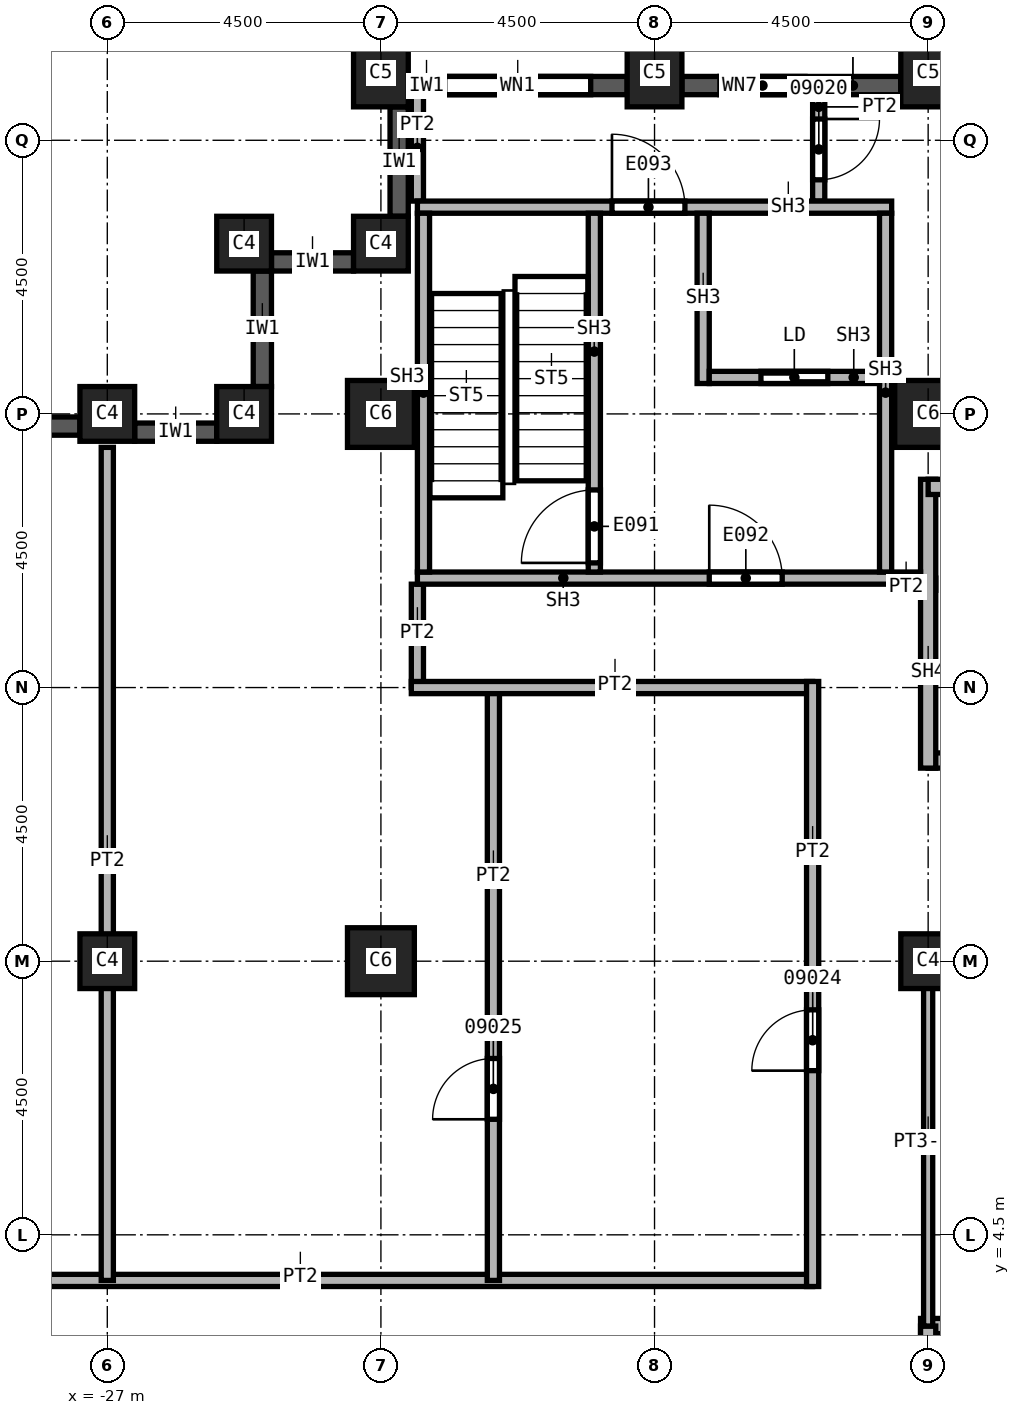
"""IFC4 building model, lengths in metres.
Left out: names, types, materials, properties, quantities, classifications, styles, units other than length and angle.
Written with IfcOpenShell. Run it as: python <this file> out.ifc"""

import sys

from ifc_helpers import new_model, si_unit, direction, frame, frame_2d, origin, origin_2d, place, context, subcontext, project, spatial, rectangle, extrude, element, fill, save


model = new_model("IFC4")
c1 = context("Model", 3, precision=1e-05, world=origin(), true_north=direction((0.0, 1.0)))
c2 = subcontext(c1, "Body", "Model", "MODEL_VIEW")
j1 = project(units=[si_unit("LENGTHUNIT", "METRE"), si_unit("PLANEANGLEUNIT", "RADIAN")], contexts=[c1])
p1 = place(None, origin())
s1 = spatial("IfcSite", under=j1, at=p1, CompositionType="ELEMENT")
p2 = place(p1, origin())
s2 = spatial("IfcBuilding", under=s1, at=p2, CompositionType="ELEMENT")
p3 = place(p2, frame((0.0, 0.0, 166.0)))
s3 = spatial("IfcBuildingStorey", under=s2, at=p3, CompositionType="ELEMENT", Elevation=166.0)
for number, where, z_axis, x_axis in (
    (1, (-13.5, 18.0, 0.0), (0.0, 0.0, 1.0), (1.0, 0.0, 0.0)),
    (2, (-22.5, 9.0, 0.0), (0.0, 0.0, 1.0), (1.0, 0.0, 0.0)),
    (3, (-22.5, 18.0, 0.0), (0.0, 0.0, 1.0), (1.0, 0.0, 0.0)),
):
    element("IfcColumn", number, at=place(p3, frame(where, z_axis=z_axis, x_axis=x_axis)), inside=s3, PredefinedType="COLUMN", context=c2, shape_type="SweptSolid", body=[
        extrude(rectangle(XDim=1.1, YDim=1.1, at=origin_2d()), origin(), (0.0, 0.0, 1.0), 3.7),
    ])
p4 = place(p3, frame((-13.5, 9.0, 0.0), z_axis=(0.0, 0.0, 1.0), x_axis=(1.0, 0.0, 0.0)))
e4 = element("IfcColumn", 4, at=p4, inside=s3, PredefinedType="COLUMN", context=c2, shape_type="SweptSolid", body=[
    extrude(rectangle(XDim=0.9, YDim=0.9, at=origin_2d()), origin(), (0.0, 0.0, 1.0), 3.7),
])
for number, where, z_axis, x_axis in (
    (5, (-13.5, 23.6, 0.0), (0.0, 0.0, 1.0), (1.0, 0.0, 0.0)),
    (6, (-18.0, 23.6, 0.0), (0.0, 0.0, 1.0), (1.0, 0.0, 0.0)),
    (7, (-22.5, 23.6, 0.0), (0.0, 0.0, 1.0), (1.0, 0.0, 0.0)),
):
    element("IfcColumn", number, at=place(p3, frame(where, z_axis=z_axis, x_axis=x_axis)), inside=s3, PredefinedType="COLUMN", context=c2, shape_type="SweptSolid", body=[
        extrude(rectangle(XDim=0.9, YDim=1.1, at=origin_2d()), origin(), (0.0, 0.0, 1.0), 3.7),
    ])
for number, where, z_axis, x_axis in (
    (8, (-27.0, 9.0, 0.0), (0.0, 0.0, 1.0), (1.0, 0.0, 0.0)),
    (9, (-27.0, 18.0, 0.0), (0.0, 0.0, 1.0), (1.0, 0.0, 0.0)),
    (10, (-22.5, 20.8, 0.0), (0.0, 0.0, 1.0), (1.0, 0.0, 0.0)),
    (11, (-24.75, 20.8, 0.0), (0.0, 0.0, 1.0), (1.0, 0.0, 0.0)),
    (12, (-24.75, 18.0, 0.0), (0.0, 0.0, 1.0), (1.0, 0.0, 0.0)),
):
    element("IfcColumn", number, at=place(p3, frame(where, z_axis=z_axis, x_axis=x_axis)), inside=s3, PredefinedType="COLUMN", context=c2, shape_type="SweptSolid", body=[
        extrude(rectangle(XDim=0.9, YDim=0.9, at=origin_2d()), origin(), (0.0, 0.0, 1.0), 3.7),
    ])
p5 = place(p3, frame((-22.2, 23.05, 0.0), z_axis=(0.0, 0.0, 1.0), x_axis=(0.0, -1.0, 0.0)))
e13 = element("IfcWall", 13, at=p5, inside=s3, PredefinedType="SOLIDWALL", context=c2, shape_type="SweptSolid", body=[
    extrude(rectangle(XDim=1.8, YDim=0.3, at=frame_2d((0.9, 0.0))), origin(), (0.0, 0.0, 1.0), 3.1),
])
p6 = place(p3, frame((-22.95, 20.5, 0.0), z_axis=(0.0, 0.0, 1.0), x_axis=(-1.0, 0.0, 0.0)))
e14 = element("IfcWall", 14, at=p6, inside=s3, PredefinedType="SOLIDWALL", context=c2, shape_type="SweptSolid", body=[
    extrude(rectangle(XDim=1.35, YDim=0.3, at=frame_2d((0.675, 0.0))), origin(), (0.0, 0.0, 1.0), 3.1),
])
p7 = place(p3, frame((-24.45, 20.35, 0.0), z_axis=(0.0, 0.0, 1.0), x_axis=(0.0, -1.0, 0.0)))
e15 = element("IfcWall", 15, at=p7, inside=s3, PredefinedType="SOLIDWALL", context=c2, shape_type="SweptSolid", body=[
    extrude(rectangle(XDim=1.9, YDim=0.3, at=frame_2d((0.95, 0.0))), origin(), (0.0, 0.0, 1.0), 3.1),
])
p8 = place(p3, frame((-25.2, 17.7, 0.0), z_axis=(0.0, 0.0, 1.0), x_axis=(-1.0, 0.0, 0.0)))
e16 = element("IfcWall", 16, at=p8, inside=s3, PredefinedType="SOLIDWALL", context=c2, shape_type="SweptSolid", body=[
    extrude(rectangle(XDim=1.35, YDim=0.3, at=frame_2d((0.675, 0.0))), origin(), (0.0, 0.0, 1.0), 3.1),
])
p9 = place(p3, frame((-27.45, 17.8, 0.0), z_axis=(0.0, 0.0, 1.0), x_axis=(-1.0, 0.0, 0.0)))
e17 = element("IfcWall", 17, at=p9, inside=s3, PredefinedType="SOLIDWALL", context=c2, shape_type="SweptSolid", body=[
    extrude(rectangle(XDim=3.6, YDim=0.3, at=frame_2d((1.8, 0.0))), origin(), (0.0, 0.0, 1.0), 3.1),
])
p10 = place(p9, frame((0.6, 0.0, 0.8)))
e18 = element("IfcOpeningElement", 18, at=p10, cuts=e17, PredefinedType="OPENING", context=c2, shape_type="SweptSolid", body=[
    extrude(rectangle(XDim=2.4, YDim=1.95, at=frame_2d((1.2, 0.975))), frame((0.0, 0.15, 0.0), z_axis=(0.0, -1.0, 0.0), x_axis=(1.0, 0.0, 0.0)), (0.0, 0.0, 1.0), 0.3),
])
p11 = place(p3, frame((-13.95, 23.4, 0.0), z_axis=(0.0, 0.0, 1.0), x_axis=(-1.0, 0.0, 0.0)))
e19 = element("IfcWall", 19, at=p11, inside=s3, PredefinedType="SOLIDWALL", context=c2, shape_type="SweptSolid", body=[
    extrude(rectangle(XDim=3.6, YDim=0.3, at=frame_2d((1.8, 0.0))), origin(), (0.0, 0.0, 1.0), 3.1),
])
p12 = place(p11, frame((1.575, 0.0, 0.8)))
e20 = element("IfcOpeningElement", 20, at=p12, cuts=e19, PredefinedType="OPENING", context=c2, shape_type="SweptSolid", body=[
    extrude(rectangle(XDim=1.4, YDim=1.95, at=frame_2d((0.7, 0.975))), frame((0.0, 0.15, 0.0), z_axis=(0.0, -1.0, 0.0), x_axis=(1.0, 0.0, 0.0)), (0.0, 0.0, 1.0), 0.3),
])
p13 = place(p3, frame((-18.45, 23.4, 0.0), z_axis=(0.0, 0.0, 1.0), x_axis=(-1.0, 0.0, 0.0)))
e21 = element("IfcWall", 21, at=p13, inside=s3, PredefinedType="SOLIDWALL", context=c2, shape_type="SweptSolid", body=[
    extrude(rectangle(XDim=3.6, YDim=0.3, at=frame_2d((1.8, 0.0))), origin(), (0.0, 0.0, 1.0), 3.1),
])
p14 = place(p13, frame((0.6, 0.0, 0.8)))
e22 = element("IfcOpeningElement", 22, at=p14, cuts=e21, PredefinedType="OPENING", context=c2, shape_type="SweptSolid", body=[
    extrude(rectangle(XDim=2.4, YDim=1.95, at=frame_2d((1.2, 0.975))), frame((0.0, 0.15, 0.0), z_axis=(0.0, -1.0, 0.0), x_axis=(1.0, 0.0, 0.0)), (0.0, 0.0, 1.0), 0.3),
])
p15 = place(p3, frame((-33.85, 3.75, 0.0), z_axis=(0.0, 0.0, 1.0), x_axis=(1.0, 0.0, 0.0)))
e23 = element("IfcWall", 23, at=p15, inside=s3, PredefinedType="PARTITIONING", context=c2, shape_type="SweptSolid", body=[
    extrude(rectangle(XDim=18.45, YDim=0.2, at=frame_2d((9.225, 0.0))), origin(), (0.0, 0.0, 1.0), 3.7),
])
p16 = place(p15, frame((2.5, 0.0, 0.0)))
e24 = element("IfcOpeningElement", 24, at=p16, cuts=e23, PredefinedType="OPENING", context=c2, shape_type="SweptSolid", body=[
    extrude(rectangle(XDim=1.0, YDim=2.1, at=frame_2d((0.5, 1.05))), frame((0.0, 0.1, 0.0), z_axis=(0.0, -1.0, 0.0), x_axis=(1.0, 0.0, 0.0)), (0.0, 0.0, 1.0), 0.2),
])
p17 = place(p3, frame((-27.0, 3.75, 0.0), z_axis=(0.0, 0.0, 1.0), x_axis=(0.0, 1.0, 0.0)))
e25 = element("IfcWall", 25, at=p17, inside=s3, PredefinedType="PARTITIONING", context=c2, shape_type="SweptSolid", body=[
    extrude(rectangle(XDim=13.7, YDim=0.2, at=frame_2d((6.85, 0.0))), origin(), (0.0, 0.0, 1.0), 3.7),
])
p18 = place(p3, frame((-21.9, 13.5, 0.0), z_axis=(0.0, 0.0, 1.0), x_axis=(0.0, 1.0, 0.0)))
e26 = element("IfcWall", 26, at=p18, inside=s3, PredefinedType="PARTITIONING", context=c2, shape_type="SweptSolid", body=[
    extrude(rectangle(XDim=1.7, YDim=0.2, at=frame_2d((0.85, 0.0))), origin(), (0.0, 0.0, 1.0), 3.7),
])
p19 = place(p3, frame((-21.9, 21.5, 0.0), z_axis=(0.0, 0.0, 1.0), x_axis=(0.0, 1.0, 0.0)))
e27 = element("IfcWall", 27, at=p19, inside=s3, PredefinedType="PARTITIONING", context=c2, shape_type="SweptSolid", body=[
    extrude(rectangle(XDim=1.75, YDim=0.2, at=frame_2d((0.875, 0.0))), origin(), (0.0, 0.0, 1.0), 3.7),
])
p20 = place(p3, frame((-20.65, 3.75, 0.0), z_axis=(0.0, 0.0, 1.0), x_axis=(0.0, 1.0, 0.0)))
e28 = element("IfcWall", 28, at=p20, inside=s3, PredefinedType="PARTITIONING", context=c2, shape_type="SweptSolid", body=[
    extrude(rectangle(XDim=9.75, YDim=0.2, at=frame_2d((4.875, 0.0))), origin(), (0.0, 0.0, 1.0), 3.7),
])
p21 = place(p20, frame((2.65, 0.0, 0.0)))
e29 = element("IfcOpeningElement", 29, at=p21, cuts=e28, PredefinedType="OPENING", context=c2, shape_type="SweptSolid", body=[
    extrude(rectangle(XDim=1.0, YDim=2.1, at=frame_2d((0.5, 1.05))), frame((0.0, 0.1, 0.0), z_axis=(0.0, -1.0, 0.0), x_axis=(1.0, 0.0, 0.0)), (0.0, 0.0, 1.0), 0.2),
])
p22 = place(p3, frame((-15.4, 13.5, 0.0), z_axis=(0.0, 0.0, 1.0), x_axis=(-1.0, 0.0, 0.0)))
e30 = element("IfcWall", 30, at=p22, inside=s3, PredefinedType="PARTITIONING", context=c2, shape_type="SweptSolid", body=[
    extrude(rectangle(XDim=6.6, YDim=0.2, at=frame_2d((3.3, 0.0))), origin(), (0.0, 0.0, 1.0), 3.7),
])
p23 = place(p3, frame((-15.4, 3.65, 0.0), z_axis=(0.0, 0.0, 1.0), x_axis=(0.0, 1.0, 0.0)))
e31 = element("IfcWall", 31, at=p23, inside=s3, PredefinedType="PARTITIONING", context=c2, shape_type="SweptSolid", body=[
    extrude(rectangle(XDim=9.95, YDim=0.2, at=frame_2d((4.975, 0.0))), origin(), (0.0, 0.0, 1.0), 3.7),
])
p24 = place(p23, frame((3.55, 0.0, 0.0)))
e32 = element("IfcOpeningElement", 32, at=p24, cuts=e31, PredefinedType="OPENING", context=c2, shape_type="SweptSolid", body=[
    extrude(rectangle(XDim=1.0, YDim=2.1, at=frame_2d((0.5, 1.05))), frame((0.0, 0.1, 0.0), z_axis=(0.0, -1.0, 0.0), x_axis=(1.0, 0.0, 0.0)), (0.0, 0.0, 1.0), 0.2),
])
p25 = place(p3, frame((-15.3, 23.25, 0.0), z_axis=(0.0, 0.0, 1.0), x_axis=(0.0, -1.0, 0.0)))
e33 = element("IfcWall", 33, at=p25, inside=s3, PredefinedType="PARTITIONING", context=c2, shape_type="SweptSolid", body=[
    extrude(rectangle(XDim=1.75, YDim=0.2, at=frame_2d((0.875, 0.0))), origin(), (0.0, 0.0, 1.0), 3.7),
])
p26 = place(p25, frame((0.4, 0.0, 0.0)))
e34 = element("IfcOpeningElement", 34, at=p26, cuts=e33, PredefinedType="OPENING", context=c2, shape_type="SweptSolid", body=[
    extrude(rectangle(XDim=1.0, YDim=2.1, at=frame_2d((0.5, 1.05))), frame((0.0, 0.1, 0.0), z_axis=(0.0, -1.0, 0.0), x_axis=(1.0, 0.0, 0.0)), (0.0, 0.0, 1.0), 0.2),
])
p27 = place(p3, frame((-14.1, 15.2, 0.0), z_axis=(0.0, 0.0, 1.0), x_axis=(1.0, 0.0, 0.0)))
e35 = element("IfcWall", 35, at=p27, inside=s3, PredefinedType="PARTITIONING", context=c2, shape_type="SweptSolid", body=[
    extrude(rectangle(XDim=0.725, YDim=0.2, at=frame_2d((0.363, 0.0))), origin(), (0.0, 0.0, 1.0), 3.7),
])
p28 = place(p3, frame((-13.625, 3.0, 0.0), z_axis=(0.0, 0.0, 1.0), x_axis=(1.0, 0.0, 0.0)))
e36 = element("IfcWall", 36, at=p28, inside=s3, PredefinedType="SOLIDWALL", context=c2, shape_type="SweptSolid", body=[
    extrude(rectangle(XDim=6.125, YDim=0.25, at=frame_2d((3.062, 0.0))), origin(), (0.0, 0.0, 1.0), 3.7),
])
p29 = place(p28, frame((3.25, 0.0, 0.0)))
e37 = element("IfcOpeningElement", 37, at=p29, cuts=e36, PredefinedType="OPENING", context=c2, shape_type="SweptSolid", body=[
    extrude(rectangle(XDim=1.1, YDim=2.1, at=frame_2d((0.55, 1.05))), frame((0.0, 0.125, 0.0), z_axis=(0.0, -1.0, 0.0), x_axis=(1.0, 0.0, 0.0)), (0.0, 0.0, 1.0), 0.25),
])
p30 = place(p3, frame((-13.5, -3.0, 0.0), z_axis=(0.0, 0.0, 1.0), x_axis=(0.0, 1.0, 0.0)))
e38 = element("IfcWall", 38, at=p30, inside=s3, PredefinedType="SOLIDWALL", context=c2, shape_type="SweptSolid", body=[
    extrude(rectangle(XDim=6.0, YDim=0.25, at=frame_2d((3.0, 0.0))), origin(), (0.0, 0.0, 1.0), 2.938),
])
p31 = place(p3, frame((-13.5, 12.3, 0.0), z_axis=(0.0, 0.0, 1.0), x_axis=(1.0, 0.0, 0.0)))
e39 = element("IfcWall", 39, at=p31, inside=s3, PredefinedType="SOLIDWALL", context=c2, shape_type="SweptSolid", body=[
    extrude(rectangle(XDim=9.125, YDim=0.25, at=frame_2d((4.562, 0.0))), origin(), (0.0, 0.0, 1.0), 3.7),
])
p32 = place(p31, frame((0.6, 0.0, 0.0)))
e40 = element("IfcOpeningElement", 40, at=p32, cuts=e39, PredefinedType="OPENING", context=c2, shape_type="SweptSolid", body=[
    extrude(rectangle(XDim=1.2, YDim=2.1, at=frame_2d((0.6, 1.05))), frame((0.0, 0.125, 0.0), z_axis=(0.0, -1.0, 0.0), x_axis=(1.0, 0.0, 0.0)), (0.0, 0.0, 1.0), 0.25),
])
p33 = place(p3, frame((-13.5, 12.175, 0.0), z_axis=(0.0, 0.0, 1.0), x_axis=(0.0, 1.0, 0.0)))
e41 = element("IfcWall", 41, at=p33, inside=s3, PredefinedType="SOLIDWALL", context=c2, shape_type="SweptSolid", body=[
    extrude(rectangle(XDim=4.75, YDim=0.25, at=frame_2d((2.375, 0.0))), origin(), (0.0, 0.0, 1.0), 3.7),
])
p34 = place(p3, frame((-13.5, 16.8, 0.0), z_axis=(0.0, 0.0, 1.0), x_axis=(1.0, 0.0, 0.0)))
e42 = element("IfcWall", 42, at=p34, inside=s3, PredefinedType="SOLIDWALL", context=c2, shape_type="SweptSolid", body=[
    extrude(rectangle(XDim=9.125, YDim=0.25, at=frame_2d((4.562, 0.0))), origin(), (0.0, 0.0, 1.0), 3.7),
])
p35 = place(p3, frame((-13.5, 3.0, 0.0), z_axis=(0.0, 0.0, 1.0), x_axis=(0.0, 1.0, 0.0)))
e43 = element("IfcWall", 43, at=p35, inside=s3, PredefinedType="PARTITIONING", context=c2, shape_type="SweptSolid", body=[
    extrude(rectangle(XDim=6.075, YDim=0.15, at=frame_2d((3.038, 0.0))), origin(), (0.0, 0.0, 1.0), 2.938),
])
p36 = place(p3, frame((-13.5, 9.0, 0.0), z_axis=(0.0, 0.0, 1.0), x_axis=(1.0, 0.0, 0.0)))
e44 = element("IfcWall", 44, at=p36, inside=s3, PredefinedType="PARTITIONING", context=c2, shape_type="SweptSolid", body=[
    extrude(rectangle(XDim=3.0, YDim=0.15, at=frame_2d((1.5, 0.0))), origin(), (0.0, 0.0, 1.0), 2.938),
])
p37 = place(p3, frame((-21.9, 15.3, 0.0), z_axis=(0.0, 0.0, 1.0), x_axis=(1.0, 0.0, 0.0)))
e45 = element("IfcWall", 45, at=p37, inside=s3, PredefinedType="SOLIDWALL", context=c2, shape_type="SweptSolid", body=[
    extrude(rectangle(XDim=8.275, YDim=0.2, at=frame_2d((4.137, 0.0))), origin(), (0.0, 0.0, 1.0), 3.7),
])
p38 = place(p37, frame((4.8, 0.0, 0.0)))
e46 = element("IfcOpeningElement", 46, at=p38, cuts=e45, PredefinedType="OPENING", context=c2, shape_type="SweptSolid", body=[
    extrude(rectangle(XDim=1.2, YDim=2.1, at=frame_2d((0.6, 1.05))), frame((0.0, 0.1, 0.0), z_axis=(0.0, -1.0, 0.0), x_axis=(1.0, 0.0, 0.0)), (0.0, 0.0, 1.0), 0.2),
])
p39 = place(p3, frame((-21.9, 21.4, 0.0), z_axis=(0.0, 0.0, 1.0), x_axis=(1.0, 0.0, 0.0)))
e47 = element("IfcWall", 47, at=p39, inside=s3, PredefinedType="SOLIDWALL", context=c2, shape_type="SweptSolid", body=[
    extrude(rectangle(XDim=7.8, YDim=0.2, at=frame_2d((3.9, 0.0))), origin(), (0.0, 0.0, 1.0), 3.7),
])
p40 = place(p39, frame((3.2, 0.0, 0.0)))
e48 = element("IfcOpeningElement", 48, at=p40, cuts=e47, PredefinedType="OPENING", context=c2, shape_type="SweptSolid", body=[
    extrude(rectangle(XDim=1.2, YDim=2.1, at=frame_2d((0.6, 1.05))), frame((0.0, 0.1, 0.0), z_axis=(0.0, -1.0, 0.0), x_axis=(1.0, 0.0, 0.0)), (0.0, 0.0, 1.0), 0.2),
])
for number, where, z_axis, x_axis in (
    (49, (-21.8, 15.4, 0.0), (0.0, 0.0, 1.0), (0.0, 1.0, 0.0)),
    (50, (-14.2, 15.4, 0.0), (0.0, 0.0, 1.0), (0.0, 1.0, 0.0)),
):
    element("IfcWall", number, at=place(p3, frame(where, z_axis=z_axis, x_axis=x_axis)), inside=s3, PredefinedType="SOLIDWALL", context=c2, shape_type="SweptSolid", body=[
        extrude(rectangle(XDim=5.9, YDim=0.2, at=frame_2d((2.95, 0.0))), origin(), (0.0, 0.0, 1.0), 3.7),
    ])
p41 = place(p3, frame((-18.99, 15.4, 0.0), z_axis=(0.0, 0.0, 1.0), x_axis=(0.0, 1.0, 0.0)))
e51 = element("IfcWall", 51, at=p41, inside=s3, PredefinedType="SOLIDWALL", context=c2, shape_type="SweptSolid", body=[
    extrude(rectangle(XDim=5.9, YDim=0.2, at=frame_2d((2.95, 0.0))), origin(), (0.0, 0.0, 1.0), 3.7),
])
p42 = place(p41, frame((0.15, 0.0, 0.0)))
e52 = element("IfcOpeningElement", 52, at=p42, cuts=e51, PredefinedType="OPENING", context=c2, shape_type="SweptSolid", body=[
    extrude(rectangle(XDim=1.2, YDim=2.1, at=frame_2d((0.6, 1.05))), frame((0.0, 0.1, 0.0), z_axis=(0.0, -1.0, 0.0), x_axis=(1.0, 0.0, 0.0)), (0.0, 0.0, 1.0), 0.2),
])
p43 = place(p3, frame((-17.2, 18.5, 0.0), z_axis=(0.0, 0.0, 1.0), x_axis=(0.0, 1.0, 0.0)))
e53 = element("IfcWall", 53, at=p43, inside=s3, PredefinedType="SOLIDWALL", context=c2, shape_type="SweptSolid", body=[
    extrude(rectangle(XDim=2.8, YDim=0.2, at=frame_2d((1.4, 0.0))), origin(), (0.0, 0.0, 1.0), 3.7),
])
p44 = place(p3, frame((-17.1, 18.6, 0.0), z_axis=(0.0, 0.0, 1.0), x_axis=(1.0, 0.0, 0.0)))
e54 = element("IfcWall", 54, at=p44, inside=s3, PredefinedType="SOLIDWALL", context=c2, shape_type="SweptSolid", body=[
    extrude(rectangle(XDim=2.8, YDim=0.2, at=frame_2d((1.4, 0.0))), origin(), (0.0, 0.0, 1.0), 3.7),
])
p45 = place(p44, frame((0.85, 0.0, 0.0)))
e55 = element("IfcOpeningElement", 55, at=p45, cuts=e54, PredefinedType="OPENING", context=c2, shape_type="SweptSolid", body=[
    extrude(rectangle(XDim=1.1, YDim=2.1, at=frame_2d((0.55, 1.05))), frame((0.0, 0.1, 0.0), z_axis=(0.0, -1.0, 0.0), x_axis=(1.0, 0.0, 0.0)), (0.0, 0.0, 1.0), 0.2),
])
p46 = place(p14, origin())
e56 = element("IfcWindow", 56, at=p46, inside=s3, PartitioningType="SINGLE_PANEL", PredefinedType="WINDOW", context=c2, shape_type="SweptSolid", body=[
    extrude(rectangle(XDim=2.4, YDim=1.95, at=frame_2d((1.2, 0.975))), frame((0.0, 0.03, 0.0), z_axis=(0.0, -1.0, 0.0), x_axis=(1.0, 0.0, 0.0)), (0.0, 0.0, 1.0), 0.06),
])
fill(e22, e56)
p47 = place(p26, origin())
e57 = element("IfcDoor", 57, at=p47, inside=s3, OperationType="SINGLE_SWING_LEFT", PredefinedType="DOOR", context=c2, shape_type="SweptSolid", body=[
    extrude(rectangle(XDim=1.0, YDim=2.1, at=frame_2d((0.5, 1.05))), frame((0.0, 0.025, 0.0), z_axis=(0.0, -1.0, 0.0), x_axis=(1.0, 0.0, 0.0)), (0.0, 0.0, 1.0), 0.05),
])
fill(e34, e57)
p48 = place(p24, origin())
e58 = element("IfcDoor", 58, at=p48, inside=s3, OperationType="SINGLE_SWING_LEFT", PredefinedType="DOOR", context=c2, shape_type="SweptSolid", body=[
    extrude(rectangle(XDim=1.0, YDim=2.1, at=frame_2d((0.5, 1.05))), frame((0.0, 0.025, 0.0), z_axis=(0.0, -1.0, 0.0), x_axis=(1.0, 0.0, 0.0)), (0.0, 0.0, 1.0), 0.05),
])
fill(e32, e58)
p49 = place(p21, origin())
e59 = element("IfcDoor", 59, at=p49, inside=s3, OperationType="SINGLE_SWING_RIGHT", PredefinedType="DOOR", context=c2, shape_type="SweptSolid", body=[
    extrude(rectangle(XDim=1.0, YDim=2.1, at=frame_2d((0.5, 1.05))), frame((0.0, 0.025, 0.0), z_axis=(0.0, -1.0, 0.0), x_axis=(1.0, 0.0, 0.0)), (0.0, 0.0, 1.0), 0.05),
])
fill(e29, e59)
p50 = place(p42, origin())
e60 = element("IfcDoor", 60, at=p50, inside=s3, OperationType="SINGLE_SWING_LEFT", PredefinedType="DOOR", context=c2, shape_type="SweptSolid", body=[
    extrude(rectangle(XDim=1.2, YDim=2.1, at=frame_2d((0.6, 1.05))), frame((0.0, 0.025, 0.0), z_axis=(0.0, -1.0, 0.0), x_axis=(1.0, 0.0, 0.0)), (0.0, 0.0, 1.0), 0.05),
])
fill(e52, e60)
p51 = place(p45, origin())
e61 = element("IfcDoor", 61, at=p51, inside=s3, OperationType="SLIDING_TO_LEFT", PredefinedType="DOOR", context=c2, shape_type="SweptSolid", body=[
    extrude(rectangle(XDim=1.1, YDim=2.1, at=frame_2d((0.55, 1.05))), frame((0.0, 0.025, 0.0), z_axis=(0.0, -1.0, 0.0), x_axis=(1.0, 0.0, 0.0)), (0.0, 0.0, 1.0), 0.05),
])
fill(e55, e61)
p52 = place(p38, origin())
e62 = element("IfcDoor", 62, at=p52, inside=s3, OperationType="SINGLE_SWING_RIGHT", PredefinedType="DOOR", context=c2, shape_type="SweptSolid", body=[
    extrude(rectangle(XDim=1.2, YDim=2.1, at=frame_2d((0.6, 1.05))), frame((0.0, 0.025, 0.0), z_axis=(0.0, -1.0, 0.0), x_axis=(1.0, 0.0, 0.0)), (0.0, 0.0, 1.0), 0.05),
])
fill(e46, e62)
p53 = place(p40, origin())
e63 = element("IfcDoor", 63, at=p53, inside=s3, OperationType="SINGLE_SWING_LEFT", PredefinedType="DOOR", context=c2, shape_type="SweptSolid", body=[
    extrude(rectangle(XDim=1.2, YDim=2.1, at=frame_2d((0.6, 1.05))), frame((0.0, 0.025, 0.0), z_axis=(0.0, -1.0, 0.0), x_axis=(1.0, 0.0, 0.0)), (0.0, 0.0, 1.0), 0.05),
])
fill(e48, e63)
p54 = place(p12, origin())
e64 = element("IfcWindow", 64, at=p54, inside=s3, PartitioningType="SINGLE_PANEL", PredefinedType="WINDOW", context=c2, shape_type="SweptSolid", body=[
    extrude(rectangle(XDim=1.4, YDim=1.95, at=frame_2d((0.7, 0.975))), frame((0.0, 0.03, 0.0), z_axis=(0.0, -1.0, 0.0), x_axis=(1.0, 0.0, 0.0)), (0.0, 0.0, 1.0), 0.06),
])
fill(e20, e64)
save(model, sys.argv[1])
